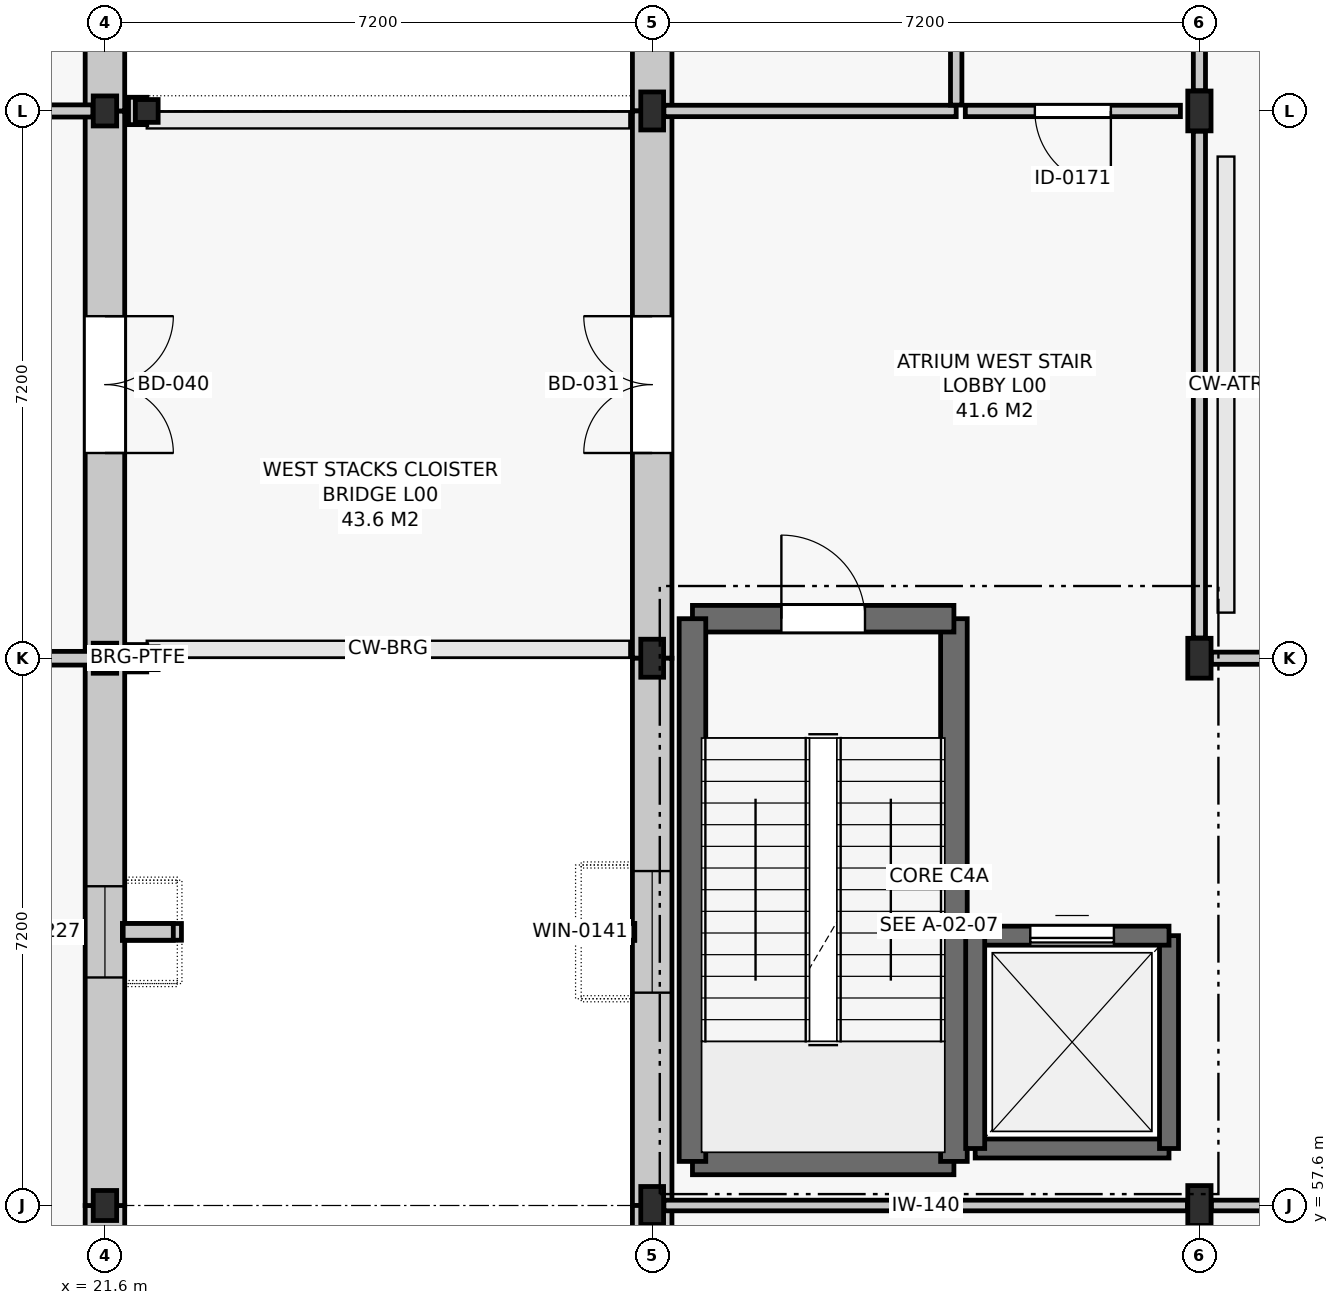
"""IFC4 building model, lengths in metres.
Left out: names, types, materials, properties, quantities, classifications, styles, units other than length and angle.
Written with IfcOpenShell. Run it as: python <this file> out.ifc"""

import sys

from ifc_helpers import new_model, si_unit, direction, frame, frame_2d, origin, origin_2d, place, context, subcontext, project, spatial, rectangle, i_section, extrude, element, fill, save


model = new_model("IFC4")
c1 = context("Model", 3, precision=1e-05, world=origin(), true_north=direction((0.0, 1.0)))
c2 = subcontext(c1, "Body", "Model", "MODEL_VIEW")
j1 = project(units=[si_unit("LENGTHUNIT", "METRE"), si_unit("PLANEANGLEUNIT", "RADIAN")], contexts=[c1])
p1 = place(None, origin())
s1 = spatial("IfcSite", under=j1, at=p1, CompositionType="ELEMENT")
p2 = place(p1, origin())
s2 = spatial("IfcBuilding", under=s1, at=p2, CompositionType="ELEMENT")
p3 = place(p2, origin())
s3 = spatial("IfcBuildingStorey", under=s2, at=p3, CompositionType="ELEMENT", Elevation=0.0)
for number, where, z_axis, x_axis in (
    (1, (28.8, 57.6, 0.0), (0.0, 0.0, 1.0), (1.0, 0.0, 0.0)),
    (2, (28.8, 64.8, 0.0), (0.0, 0.0, 1.0), (1.0, 0.0, 0.0)),
    (3, (28.8, 72.0, 0.0), (0.0, 0.0, 1.0), (1.0, 0.0, 0.0)),
):
    element("IfcColumn", number, at=place(p3, frame(where, z_axis=z_axis, x_axis=x_axis)), inside=s3, PredefinedType="COLUMN", context=c2, shape_type="SweptSolid", body=[
        extrude(i_section(OverallWidth=0.3, OverallDepth=0.5, WebThickness=0.014, FlangeThickness=0.028, FilletRadius=0.027, at=origin_2d()), origin(), (0.0, 0.0, 1.0), 5.4),
    ])
for number, where, z_axis, x_axis in (
    (4, (36.0, 57.6, 0.0), (0.0, 0.0, 1.0), (1.0, 0.0, 0.0)),
    (5, (36.0, 64.8, 0.0), (0.0, 0.0, 1.0), (1.0, 0.0, 0.0)),
    (6, (36.0, 72.0, 0.0), (0.0, 0.0, 1.0), (1.0, 0.0, 0.0)),
):
    element("IfcColumn", number, at=place(p3, frame(where, z_axis=z_axis, x_axis=x_axis)), inside=s3, PredefinedType="COLUMN", context=c2, shape_type="SweptSolid", body=[
        extrude(i_section(OverallWidth=0.306, OverallDepth=0.524, WebThickness=0.021, FlangeThickness=0.04, FilletRadius=0.027, at=origin_2d()), origin(), (0.0, 0.0, 1.0), 5.4),
    ])
for number, where, z_axis, x_axis in (
    (7, (21.6, 57.6, 0.0), (0.0, 0.0, 1.0), (1.0, 0.0, 0.0)),
    (8, (21.6, 64.8, 0.0), (0.0, 0.0, 1.0), (1.0, 0.0, 0.0)),
    (9, (21.6, 72.0, 0.0), (0.0, 0.0, 1.0), (1.0, 0.0, 0.0)),
):
    element("IfcColumn", number, at=place(p3, frame(where, z_axis=z_axis, x_axis=x_axis)), inside=s3, PredefinedType="COLUMN", context=c2, shape_type="SweptSolid", body=[
        extrude(i_section(OverallWidth=0.308, OverallDepth=0.395, WebThickness=0.021, FlangeThickness=0.036, FilletRadius=0.027, at=origin_2d()), origin(), (0.0, 0.0, 1.0), 5.4),
    ])
for number, where, z_axis, x_axis in (
    (10, (22.15, 64.8, 0.0), (0.0, 0.0, 1.0), (1.0, 0.0, 0.0)),
    (11, (22.15, 72.0, 0.0), (0.0, 0.0, 1.0), (1.0, 0.0, 0.0)),
):
    element("IfcColumn", number, at=place(p3, frame(where, z_axis=z_axis, x_axis=x_axis)), inside=s3, PredefinedType="COLUMN", context=c2, shape_type="SweptSolid", body=[
        extrude(i_section(OverallWidth=0.3, OverallDepth=0.3, WebThickness=0.011, FlangeThickness=0.019, FilletRadius=0.027, at=origin_2d()), origin(), (0.0, 0.0, 1.0), 5.4),
    ])
p4 = place(p3, frame((28.8, 79.2, 0.0), z_axis=(0.0, 0.0, 1.0), x_axis=(0.0, -1.0, 0.0)))
e12 = element("IfcWall", 12, at=p4, inside=s3, PredefinedType="SOLIDWALL", context=c2, shape_type="SweptSolid", body=[
    extrude(rectangle(XDim=7.2, YDim=0.52, at=frame_2d((3.6, 0.0))), origin(), (0.0, 0.0, 1.0), 4.4),
])
p5 = place(p4, frame((2.8, 0.0, 0.95)))
e13 = element("IfcOpeningElement", 13, at=p5, cuts=e12, PredefinedType="OPENING", context=c2, shape_type="SweptSolid", body=[
    extrude(rectangle(XDim=1.6, YDim=2.2, at=frame_2d((0.8, 1.1))), frame((0.0, 0.272, 0.0), z_axis=(0.0, -1.0, 0.0), x_axis=(1.0, 0.0, 0.0)), (0.0, 0.0, 1.0), 0.544),
])
p6 = place(p3, frame((28.8, 72.0, 0.0), z_axis=(0.0, 0.0, 1.0), x_axis=(0.0, -1.0, 0.0)))
e14 = element("IfcWall", 14, at=p6, inside=s3, PredefinedType="SOLIDWALL", context=c2, shape_type="SweptSolid", body=[
    extrude(rectangle(XDim=7.2, YDim=0.52, at=frame_2d((3.6, 0.0))), origin(), (0.0, 0.0, 1.0), 4.4),
])
p7 = place(p6, frame((2.7, 0.0, 0.0)))
e15 = element("IfcOpeningElement", 15, at=p7, cuts=e14, PredefinedType="OPENING", context=c2, shape_type="SweptSolid", body=[
    extrude(rectangle(XDim=1.8, YDim=2.3, at=frame_2d((0.9, 1.15))), frame((0.0, 0.272, 0.0), z_axis=(0.0, -1.0, 0.0), x_axis=(1.0, 0.0, 0.0)), (0.0, 0.0, 1.0), 0.544),
])
p8 = place(p3, frame((28.8, 64.8, 0.0), z_axis=(0.0, 0.0, 1.0), x_axis=(0.0, -1.0, 0.0)))
e16 = element("IfcWall", 16, at=p8, inside=s3, PredefinedType="SOLIDWALL", context=c2, shape_type="SweptSolid", body=[
    extrude(rectangle(XDim=7.2, YDim=0.52, at=frame_2d((3.6, 0.0))), origin(), (0.0, 0.0, 1.0), 4.4),
])
p9 = place(p8, frame((2.8, 0.0, 0.95)))
e17 = element("IfcOpeningElement", 17, at=p9, cuts=e16, PredefinedType="OPENING", context=c2, shape_type="SweptSolid", body=[
    extrude(rectangle(XDim=1.6, YDim=2.2, at=frame_2d((0.8, 1.1))), frame((0.0, 0.272, 0.0), z_axis=(0.0, -1.0, 0.0), x_axis=(1.0, 0.0, 0.0)), (0.0, 0.0, 1.0), 0.544),
])
p10 = place(p3, frame((28.8, 57.6, 0.0), z_axis=(0.0, 0.0, 1.0), x_axis=(0.0, -1.0, 0.0)))
e18 = element("IfcWall", 18, at=p10, inside=s3, PredefinedType="SOLIDWALL", context=c2, shape_type="SweptSolid", body=[
    extrude(rectangle(XDim=6.946, YDim=0.52, at=frame_2d((3.473, 0.0))), origin(), (0.0, 0.0, 1.0), 4.4),
])
p11 = place(p10, frame((2.8, 0.0, 0.95)))
e19 = element("IfcOpeningElement", 19, at=p11, cuts=e18, PredefinedType="OPENING", context=c2, shape_type="SweptSolid", body=[
    extrude(rectangle(XDim=1.6, YDim=2.2, at=frame_2d((0.8, 1.1))), frame((0.0, 0.272, 0.0), z_axis=(0.0, -1.0, 0.0), x_axis=(1.0, 0.0, 0.0)), (0.0, 0.0, 1.0), 0.544),
])
p12 = place(p3, frame((21.6, 50.4, 0.0), z_axis=(0.0, 0.0, 1.0), x_axis=(0.0, 1.0, 0.0)))
e20 = element("IfcWall", 20, at=p12, inside=s3, PredefinedType="SOLIDWALL", context=c2, shape_type="SweptSolid", body=[
    extrude(rectangle(XDim=7.2, YDim=0.52, at=frame_2d((3.6, 0.0))), origin(), (0.0, 0.0, 1.0), 4.38),
])
p13 = place(p12, frame((1.3, 0.0, 0.0)))
e21 = element("IfcOpeningElement", 21, at=p13, cuts=e20, PredefinedType="OPENING", context=c2, shape_type="SweptSolid", body=[
    extrude(rectangle(XDim=1.8, YDim=2.2, at=frame_2d((0.9, 1.1))), frame((0.0, 0.272, 0.0), z_axis=(0.0, -1.0, 0.0), x_axis=(1.0, 0.0, 0.0)), (0.0, 0.0, 1.0), 0.544),
])
p14 = place(p3, frame((21.6, 57.6, 0.0), z_axis=(0.0, 0.0, 1.0), x_axis=(0.0, 1.0, 0.0)))
e22 = element("IfcWall", 22, at=p14, inside=s3, PredefinedType="SOLIDWALL", context=c2, shape_type="SweptSolid", body=[
    extrude(rectangle(XDim=7.2, YDim=0.52, at=frame_2d((3.6, 0.0))), origin(), (0.0, 0.0, 1.0), 4.38),
])
p15 = place(p14, frame((3.0, 0.0, 0.95)))
e23 = element("IfcOpeningElement", 23, at=p15, cuts=e22, PredefinedType="OPENING", context=c2, shape_type="SweptSolid", body=[
    extrude(rectangle(XDim=1.2, YDim=2.15, at=frame_2d((0.6, 1.075))), frame((0.0, 0.272, 0.0), z_axis=(0.0, -1.0, 0.0), x_axis=(1.0, 0.0, 0.0)), (0.0, 0.0, 1.0), 0.544),
])
p16 = place(p3, frame((21.6, 64.8, 0.0), z_axis=(0.0, 0.0, 1.0), x_axis=(0.0, 1.0, 0.0)))
e24 = element("IfcWall", 24, at=p16, inside=s3, PredefinedType="SOLIDWALL", context=c2, shape_type="SweptSolid", body=[
    extrude(rectangle(XDim=7.2, YDim=0.52, at=frame_2d((3.6, 0.0))), origin(), (0.0, 0.0, 1.0), 4.38),
])
p17 = place(p16, frame((2.7, 0.0, 0.0)))
e25 = element("IfcOpeningElement", 25, at=p17, cuts=e24, PredefinedType="OPENING", context=c2, shape_type="SweptSolid", body=[
    extrude(rectangle(XDim=1.8, YDim=2.3, at=frame_2d((0.9, 1.15))), frame((0.0, 0.272, 0.0), z_axis=(0.0, -1.0, 0.0), x_axis=(1.0, 0.0, 0.0)), (0.0, 0.0, 1.0), 0.544),
])
p18 = place(p3, frame((21.6, 72.0, 0.0), z_axis=(0.0, 0.0, 1.0), x_axis=(0.0, 1.0, 0.0)))
e26 = element("IfcWall", 26, at=p18, inside=s3, PredefinedType="SOLIDWALL", context=c2, shape_type="SweptSolid", body=[
    extrude(rectangle(XDim=7.2, YDim=0.52, at=frame_2d((3.6, 0.0))), origin(), (0.0, 0.0, 1.0), 4.38),
])
p19 = place(p18, frame((3.0, 0.0, 0.95)))
e27 = element("IfcOpeningElement", 27, at=p19, cuts=e26, PredefinedType="OPENING", context=c2, shape_type="SweptSolid", body=[
    extrude(rectangle(XDim=1.2, YDim=2.15, at=frame_2d((0.6, 1.075))), frame((0.0, 0.272, 0.0), z_axis=(0.0, -1.0, 0.0), x_axis=(1.0, 0.0, 0.0)), (0.0, 0.0, 1.0), 0.544),
])
p20 = place(p3, frame((29.33, 58.18, 0.0), z_axis=(0.0, 0.0, 1.0), x_axis=(1.0, 0.0, 0.0)))
e28 = element("IfcWall", 28, at=p20, inside=s3, PredefinedType="SHEAR", context=c2, shape_type="SweptSolid", body=[
    extrude(rectangle(XDim=3.44, YDim=0.35, at=frame_2d((1.72, 0.0))), origin(), (0.0, 0.0, 1.0), 5.12),
])
p21 = place(p3, frame((32.77, 58.18, 0.0), z_axis=(0.0, 0.0, 1.0), x_axis=(0.0, 1.0, 0.0)))
e29 = element("IfcWall", 29, at=p21, inside=s3, PredefinedType="SHEAR", context=c2, shape_type="SweptSolid", body=[
    extrude(rectangle(XDim=7.14, YDim=0.35, at=frame_2d((3.57, 0.0))), origin(), (0.0, 0.0, 1.0), 5.12),
])
p22 = place(p3, frame((32.77, 65.32, 0.0), z_axis=(0.0, 0.0, 1.0), x_axis=(-1.0, 0.0, 0.0)))
e30 = element("IfcWall", 30, at=p22, inside=s3, PredefinedType="SHEAR", context=c2, shape_type="SweptSolid", body=[
    extrude(rectangle(XDim=3.44, YDim=0.35, at=frame_2d((1.72, 0.0))), origin(), (0.0, 0.0, 1.0), 5.12),
])
p23 = place(p22, frame((1.17, 0.0, 0.0)))
e31 = element("IfcOpeningElement", 31, at=p23, cuts=e30, PredefinedType="OPENING", context=c2, shape_type="SweptSolid", body=[
    extrude(rectangle(XDim=1.1, YDim=2.15, at=frame_2d((0.55, 1.075))), frame((0.0, 0.187, 0.0), z_axis=(0.0, -1.0, 0.0), x_axis=(1.0, 0.0, 0.0)), (0.0, 0.0, 1.0), 0.374),
])
p24 = place(p3, frame((29.33, 65.32, 0.0), z_axis=(0.0, 0.0, 1.0), x_axis=(0.0, -1.0, 0.0)))
e32 = element("IfcWall", 32, at=p24, inside=s3, PredefinedType="SHEAR", context=c2, shape_type="SweptSolid", body=[
    extrude(rectangle(XDim=7.14, YDim=0.35, at=frame_2d((3.57, 0.0))), origin(), (0.0, 0.0, 1.0), 5.12),
])
p25 = place(p3, frame((33.05, 58.35, 0.0), z_axis=(0.0, 0.0, 1.0), x_axis=(1.0, 0.0, 0.0)))
e33 = element("IfcWall", 33, at=p25, inside=s3, PredefinedType="SHEAR", context=c2, shape_type="SweptSolid", body=[
    extrude(rectangle(XDim=2.55, YDim=0.25, at=frame_2d((1.275, 0.0))), origin(), (0.0, 0.0, 1.0), 5.12),
])
p26 = place(p3, frame((35.6, 58.35, 0.0), z_axis=(0.0, 0.0, 1.0), x_axis=(0.0, 1.0, 0.0)))
e34 = element("IfcWall", 34, at=p26, inside=s3, PredefinedType="SHEAR", context=c2, shape_type="SweptSolid", body=[
    extrude(rectangle(XDim=2.8, YDim=0.25, at=frame_2d((1.4, 0.0))), origin(), (0.0, 0.0, 1.0), 5.12),
])
p27 = place(p3, frame((35.6, 61.15, 0.0), z_axis=(0.0, 0.0, 1.0), x_axis=(-1.0, 0.0, 0.0)))
e35 = element("IfcWall", 35, at=p27, inside=s3, PredefinedType="SHEAR", context=c2, shape_type="SweptSolid", body=[
    extrude(rectangle(XDim=2.55, YDim=0.25, at=frame_2d((1.275, 0.0))), origin(), (0.0, 0.0, 1.0), 5.12),
])
p28 = place(p27, frame((0.725, 0.0, 0.0)))
e36 = element("IfcOpeningElement", 36, at=p28, cuts=e35, PredefinedType="OPENING", context=c2, shape_type="SweptSolid", body=[
    extrude(rectangle(XDim=1.1, YDim=2.1, at=frame_2d((0.55, 1.05))), frame((0.0, 0.137, 0.0), z_axis=(0.0, -1.0, 0.0), x_axis=(1.0, 0.0, 0.0)), (0.0, 0.0, 1.0), 0.274),
])
p29 = place(p3, frame((33.05, 61.15, 0.0), z_axis=(0.0, 0.0, 1.0), x_axis=(0.0, -1.0, 0.0)))
e37 = element("IfcWall", 37, at=p29, inside=s3, PredefinedType="SHEAR", context=c2, shape_type="SweptSolid", body=[
    extrude(rectangle(XDim=2.8, YDim=0.25, at=frame_2d((1.4, 0.0))), origin(), (0.0, 0.0, 1.0), 5.12),
])
p30 = place(p3, frame((28.954, 72.0, 0.0), z_axis=(0.0, 0.0, 1.0), x_axis=(1.0, 0.0, 0.0)))
e38 = element("IfcWall", 38, at=p30, inside=s3, PredefinedType="PARTITIONING", context=c2, shape_type="SweptSolid", body=[
    extrude(rectangle(XDim=3.846, YDim=0.15, at=frame_2d((1.923, 0.0))), origin(), (0.0, 0.0, 1.0), 4.615),
])
p31 = place(p3, frame((36.157, 64.8, 0.0), z_axis=(0.0, 0.0, 1.0), x_axis=(1.0, 0.0, 0.0)))
e39 = element("IfcWall", 39, at=p31, inside=s3, PredefinedType="PARTITIONING", context=c2, shape_type="SweptSolid", body=[
    extrude(rectangle(XDim=6.886, YDim=0.16, at=frame_2d((3.443, 0.0))), origin(), (0.0, 0.0, 1.0), 5.105),
])
p32 = place(p31, frame((2.943, 0.0, 0.0)))
e40 = element("IfcOpeningElement", 40, at=p32, cuts=e39, PredefinedType="OPENING", context=c2, shape_type="SweptSolid", body=[
    extrude(rectangle(XDim=1.0, YDim=2.15, at=frame_2d((0.5, 1.075))), frame((0.0, 0.092, 0.0), z_axis=(0.0, -1.0, 0.0), x_axis=(1.0, 0.0, 0.0)), (0.0, 0.0, 1.0), 0.184),
])
p33 = place(p3, frame((28.954, 57.6, 0.0), z_axis=(0.0, 0.0, 1.0), x_axis=(1.0, 0.0, 0.0)))
e41 = element("IfcWall", 41, at=p33, inside=s3, PredefinedType="PARTITIONING", context=c2, shape_type="SweptSolid", body=[
    extrude(rectangle(XDim=6.889, YDim=0.14, at=frame_2d((3.444, 0.0))), origin(), (0.0, 0.0, 1.0), 4.615),
])
p34 = place(p3, frame((36.157, 57.6, 0.0), z_axis=(0.0, 0.0, 1.0), x_axis=(1.0, 0.0, 0.0)))
e42 = element("IfcWall", 42, at=p34, inside=s3, PredefinedType="PARTITIONING", context=c2, shape_type="SweptSolid", body=[
    extrude(rectangle(XDim=6.886, YDim=0.14, at=frame_2d((3.443, 0.0))), origin(), (0.0, 0.0, 1.0), 4.615),
])
p35 = place(p34, frame((2.618, 0.0, 0.0)))
e43 = element("IfcOpeningElement", 43, at=p35, cuts=e42, PredefinedType="OPENING", context=c2, shape_type="SweptSolid", body=[
    extrude(rectangle(XDim=1.65, YDim=2.25, at=frame_2d((0.825, 1.125))), frame((0.0, 0.082, 0.0), z_axis=(0.0, -1.0, 0.0), x_axis=(1.0, 0.0, 0.0)), (0.0, 0.0, 1.0), 0.164),
])
p36 = place(p3, frame((14.557, 72.0, 0.0), z_axis=(0.0, 0.0, 1.0), x_axis=(1.0, 0.0, 0.0)))
e44 = element("IfcWall", 44, at=p36, inside=s3, PredefinedType="PARTITIONING", context=c2, shape_type="SweptSolid", body=[
    extrude(rectangle(XDim=6.885, YDim=0.16, at=frame_2d((3.442, 0.0))), origin(), (0.0, 0.0, 1.0), 4.485),
])
p37 = place(p3, frame((14.557, 64.8, 0.0), z_axis=(0.0, 0.0, 1.0), x_axis=(1.0, 0.0, 0.0)))
e45 = element("IfcWall", 45, at=p37, inside=s3, PredefinedType="PARTITIONING", context=c2, shape_type="SweptSolid", body=[
    extrude(rectangle(XDim=6.885, YDim=0.18, at=frame_2d((3.442, 0.0))), origin(), (0.0, 0.0, 1.0), 4.485),
])
p38 = place(p3, frame((32.8, 72.077, 0.0), z_axis=(0.0, 0.0, 1.0), x_axis=(0.0, 1.0, 0.0)))
e46 = element("IfcWall", 46, at=p38, inside=s3, PredefinedType="PARTITIONING", context=c2, shape_type="SweptSolid", body=[
    extrude(rectangle(XDim=6.046, YDim=0.15, at=frame_2d((3.023, 0.0))), origin(), (0.0, 0.0, 1.0), 4.615),
])
p39 = place(p38, frame((2.533, 0.0, 0.0)))
e47 = element("IfcOpeningElement", 47, at=p39, cuts=e46, PredefinedType="OPENING", context=c2, shape_type="SweptSolid", body=[
    extrude(rectangle(XDim=0.98, YDim=2.1, at=frame_2d((0.49, 1.05))), frame((0.0, 0.087, 0.0), z_axis=(0.0, -1.0, 0.0), x_axis=(1.0, 0.0, 0.0)), (0.0, 0.0, 1.0), 0.174),
])
for number, where, z_axis, x_axis in (
    (48, (36.0, 65.066, 0.0), (0.0, 0.0, 1.0), (0.0, 1.0, 0.0)),
    (49, (36.0, 72.266, 0.0), (0.0, 0.0, 1.0), (0.0, 1.0, 0.0)),
):
    element("IfcWall", number, at=place(p3, frame(where, z_axis=z_axis, x_axis=x_axis)), inside=s3, PredefinedType="PARTITIONING", context=c2, shape_type="SweptSolid", body=[
        extrude(rectangle(XDim=6.668, YDim=0.16, at=frame_2d((3.334, 0.0))), origin(), (0.0, 0.0, 1.0), 5.105),
    ])
p40 = place(p3, frame((32.92, 72.0, 0.0), z_axis=(0.0, 0.0, 1.0), x_axis=(1.0, 0.0, 0.0)))
e50 = element("IfcWall", 50, at=p40, inside=s3, PredefinedType="PARTITIONING", context=c2, shape_type="SweptSolid", body=[
    extrude(rectangle(XDim=2.83, YDim=0.15, at=frame_2d((1.415, 0.0))), origin(), (0.0, 0.0, 1.0), 4.615),
])
p41 = place(p40, frame((0.915, 0.0, 0.0)))
e51 = element("IfcOpeningElement", 51, at=p41, cuts=e50, PredefinedType="OPENING", context=c2, shape_type="SweptSolid", body=[
    extrude(rectangle(XDim=1.0, YDim=2.15, at=frame_2d((0.5, 1.075))), frame((0.0, 0.087, 0.0), z_axis=(0.0, -1.0, 0.0), x_axis=(1.0, 0.0, 0.0)), (0.0, 0.0, 1.0), 0.174),
])
p42 = place(p7, frame((1.8, 0.0, 0.0), z_axis=(0.0, 0.0, 1.0), x_axis=(-1.0, 0.0, 0.0)))
e52 = element("IfcDoor", 52, at=p42, inside=s3, OperationType="DOUBLE_DOOR_SINGLE_SWING", PredefinedType="DOOR", context=c2, shape_type="SweptSolid", body=[
    extrude(rectangle(XDim=1.8, YDim=2.3, at=frame_2d((0.9, 1.15))), frame((0.0, 0.025, 0.0), z_axis=(0.0, -1.0, 0.0), x_axis=(1.0, 0.0, 0.0)), (0.0, 0.0, 1.0), 0.05),
])
fill(e15, e52)
p43 = place(p9, origin())
e53 = element("IfcWindow", 53, at=p43, inside=s3, PartitioningType="SINGLE_PANEL", PredefinedType="WINDOW", context=c2, shape_type="SweptSolid", body=[
    extrude(rectangle(XDim=1.6, YDim=2.2, at=frame_2d((0.8, 1.1))), frame((0.0, 0.03, 0.0), z_axis=(0.0, -1.0, 0.0), x_axis=(1.0, 0.0, 0.0)), (0.0, 0.0, 1.0), 0.06),
])
fill(e17, e53)
p44 = place(p15, origin())
e54 = element("IfcWindow", 54, at=p44, inside=s3, PartitioningType="SINGLE_PANEL", PredefinedType="WINDOW", context=c2, shape_type="SweptSolid", body=[
    extrude(rectangle(XDim=1.2, YDim=2.15, at=frame_2d((0.6, 1.075))), frame((0.0, 0.03, 0.0), z_axis=(0.0, -1.0, 0.0), x_axis=(1.0, 0.0, 0.0)), (0.0, 0.0, 1.0), 0.06),
])
fill(e23, e54)
p45 = place(p17, frame((1.8, 0.0, 0.0), z_axis=(0.0, 0.0, 1.0), x_axis=(-1.0, 0.0, 0.0)))
e55 = element("IfcDoor", 55, at=p45, inside=s3, OperationType="DOUBLE_DOOR_SINGLE_SWING", PredefinedType="DOOR", context=c2, shape_type="SweptSolid", body=[
    extrude(rectangle(XDim=1.8, YDim=2.3, at=frame_2d((0.9, 1.15))), frame((0.0, 0.025, 0.0), z_axis=(0.0, -1.0, 0.0), x_axis=(1.0, 0.0, 0.0)), (0.0, 0.0, 1.0), 0.05),
])
fill(e25, e55)
p46 = place(p23, frame((1.1, 0.0, 0.0), z_axis=(0.0, 0.0, 1.0), x_axis=(-1.0, 0.0, 0.0)))
e56 = element("IfcDoor", 56, at=p46, inside=s3, OperationType="SINGLE_SWING_LEFT", PredefinedType="DOOR", context=c2, shape_type="SweptSolid", body=[
    extrude(rectangle(XDim=1.1, YDim=2.15, at=frame_2d((0.55, 1.075))), frame((0.0, 0.025, 0.0), z_axis=(0.0, -1.0, 0.0), x_axis=(1.0, 0.0, 0.0)), (0.0, 0.0, 1.0), 0.05),
])
fill(e31, e56)
p47 = place(p28, origin())
e57 = element("IfcDoor", 57, at=p47, inside=s3, OperationType="SLIDING_TO_LEFT", PredefinedType="DOOR", context=c2, shape_type="SweptSolid", body=[
    extrude(rectangle(XDim=1.1, YDim=2.1, at=frame_2d((0.55, 1.05))), frame((0.0, 0.025, 0.0), z_axis=(0.0, -1.0, 0.0), x_axis=(1.0, 0.0, 0.0)), (0.0, 0.0, 1.0), 0.05),
])
fill(e36, e57)
p48 = place(p41, frame((1.0, 0.0, 0.0), z_axis=(0.0, 0.0, 1.0), x_axis=(-1.0, 0.0, 0.0)))
e58 = element("IfcDoor", 58, at=p48, inside=s3, OperationType="SINGLE_SWING_LEFT", PredefinedType="DOOR", context=c2, shape_type="SweptSolid", body=[
    extrude(rectangle(XDim=1.0, YDim=2.15, at=frame_2d((0.5, 1.075))), frame((0.0, 0.025, 0.0), z_axis=(0.0, -1.0, 0.0), x_axis=(1.0, 0.0, 0.0)), (0.0, 0.0, 1.0), 0.05),
])
fill(e51, e58)
save(model, sys.argv[1])
